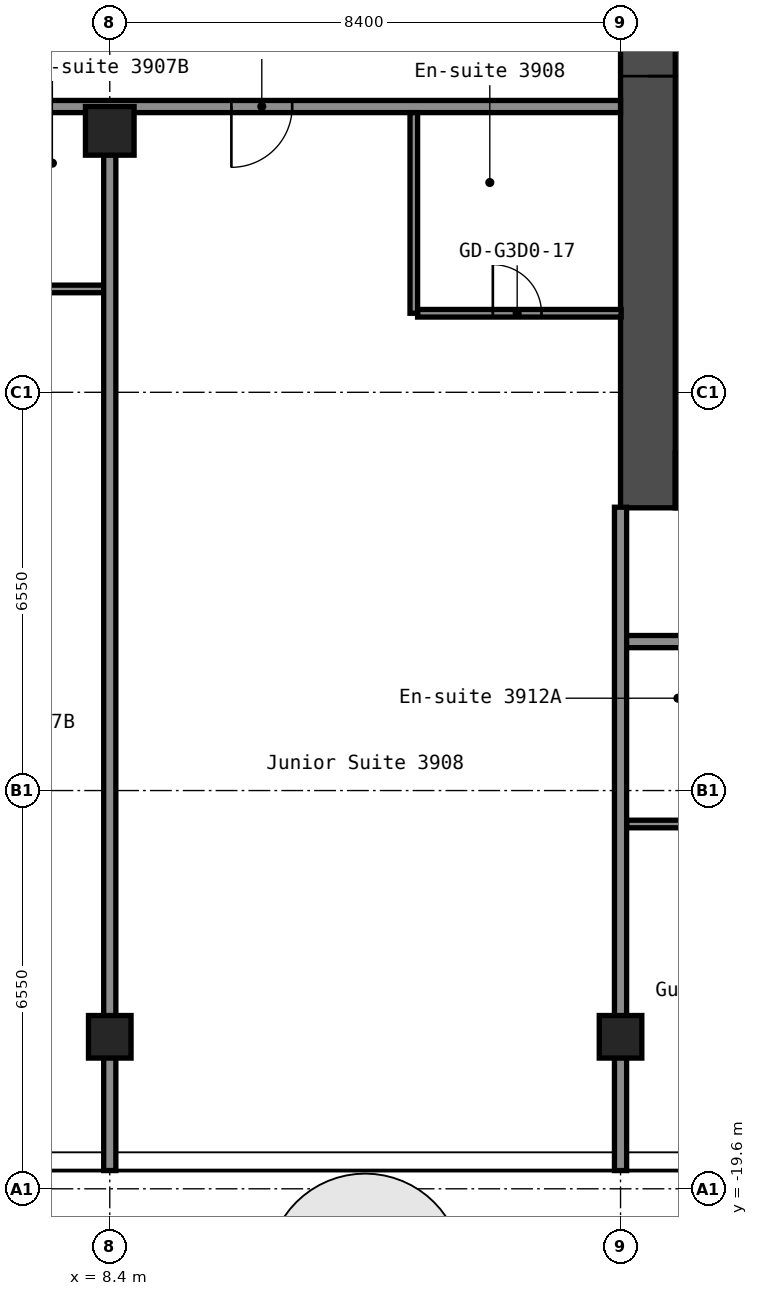
"""IFC4 building model, lengths in metres.
Left out: names, types, materials, properties, quantities, classifications, styles, units other than length and angle.
Written with IfcOpenShell. Run it as: python <this file> out.ifc"""

import sys

from ifc_helpers import new_model, si_unit, direction, frame, frame_2d, origin, origin_2d, place, context, subcontext, project, spatial, rectangle, hollow_rectangle, extrude, element, fill, save


model = new_model("IFC4")
c1 = context("Model", 3, precision=1e-05, world=origin(), true_north=direction((0.0, 1.0)))
c2 = subcontext(c1, "Body", "Model", "MODEL_VIEW")
j1 = project(units=[si_unit("LENGTHUNIT", "METRE"), si_unit("PLANEANGLEUNIT", "RADIAN")], contexts=[c1])
p1 = place(None, origin())
s1 = spatial("IfcSite", under=j1, at=p1, CompositionType="ELEMENT")
p2 = place(p1, origin())
s2 = spatial("IfcBuilding", under=s1, at=p2, CompositionType="ELEMENT")
p3 = place(p2, frame((0.0, 0.0, 140.6)))
s3 = spatial("IfcBuildingStorey", under=s2, at=p3, CompositionType="ELEMENT", Elevation=140.6)
p4 = place(p3, frame((8.4, -17.1, 0.0), z_axis=(0.0, 0.0, 1.0), x_axis=(1.0, 0.0, 0.0)))
e1 = element("IfcColumn", 1, at=p4, inside=s3, PredefinedType="COLUMN", context=c2, shape_type="SweptSolid", body=[
    extrude(hollow_rectangle(XDim=0.7, YDim=0.7, WallThickness=0.028, at=origin_2d()), origin(), (0.0, 0.0, 1.0), 2.75),
])
p5 = place(p3, frame((8.4, -2.2, 0.0), z_axis=(0.0, 0.0, 1.0), x_axis=(1.0, 0.0, 0.0)))
e2 = element("IfcColumn", 2, at=p5, inside=s3, PredefinedType="COLUMN", context=c2, shape_type="SweptSolid", body=[
    extrude(hollow_rectangle(XDim=0.8, YDim=0.8, WallThickness=0.032, at=origin_2d()), origin(), (0.0, 0.0, 1.0), 2.75),
])
p6 = place(p3, frame((16.8, -17.1, 0.0), z_axis=(0.0, 0.0, 1.0), x_axis=(1.0, 0.0, 0.0)))
e3 = element("IfcColumn", 3, at=p6, inside=s3, PredefinedType="COLUMN", context=c2, shape_type="SweptSolid", body=[
    extrude(hollow_rectangle(XDim=0.7, YDim=0.7, WallThickness=0.028, at=origin_2d()), origin(), (0.0, 0.0, 1.0), 2.75),
])
p7 = place(p3, frame((17.25, -8.4, 0.0), z_axis=(0.0, 0.0, 1.0), x_axis=(0.0, 1.0, 0.0)))
e4 = element("IfcWall", 4, at=p7, inside=s3, PredefinedType="SHEAR", context=c2, shape_type="SweptSolid", body=[
    extrude(rectangle(XDim=16.8, YDim=0.9, at=frame_2d((8.4, 0.0))), origin(), (0.0, 0.0, 1.0), 2.75),
])
p8 = place(p7, frame((7.1, 0.0, 0.0)))
e5 = element("IfcOpeningElement", 5, at=p8, cuts=e4, PredefinedType="OPENING", context=c2, shape_type="SweptSolid", body=[
    extrude(rectangle(XDim=1.6, YDim=2.1, at=frame_2d((0.8, 1.05))), frame((0.0, 0.46, 0.0), z_axis=(0.0, -1.0, 0.0), x_axis=(1.0, 0.0, 0.0)), (0.0, 0.0, 1.0), 0.92),
])
p9 = place(p3, frame((17.7, -7.95, 0.0), z_axis=(0.0, 0.0, 1.0), x_axis=(1.0, 0.0, 0.0)))
e6 = element("IfcWall", 6, at=p9, inside=s3, PredefinedType="SHEAR", context=c2, shape_type="SweptSolid", body=[
    extrude(rectangle(XDim=15.0, YDim=0.9, at=frame_2d((7.5, 0.0))), origin(), (0.0, 0.0, 1.0), 2.75),
])
p10 = place(p9, frame((2.55, 0.0, 0.0)))
e7 = element("IfcOpeningElement", 7, at=p10, cuts=e6, PredefinedType="OPENING", context=c2, shape_type="SweptSolid", body=[
    extrude(rectangle(XDim=1.0, YDim=2.1, at=frame_2d((0.5, 1.05))), frame((0.0, 0.46, 0.0), z_axis=(0.0, -1.0, 0.0), x_axis=(1.0, 0.0, 0.0)), (0.0, 0.0, 1.0), 0.92),
])
p11 = place(p3, frame((16.9, -13.6, 0.0), z_axis=(0.0, 0.0, 1.0), x_axis=(1.0, 0.0, 0.0)))
e8 = element("IfcWall", 8, at=p11, inside=s3, PredefinedType="PARTITIONING", context=c2, shape_type="SweptSolid", body=[
    extrude(rectangle(XDim=2.338, YDim=0.125, at=frame_2d((1.169, 0.0))), origin(), (0.0, 0.0, 1.0), 2.75),
])
p12 = place(p3, frame((16.8, -10.6, 0.0), z_axis=(0.0, 0.0, 1.0), x_axis=(1.0, 0.0, 0.0)))
e9 = element("IfcWall", 9, at=p12, inside=s3, PredefinedType="PARTITIONING", context=c2, shape_type="SweptSolid", body=[
    extrude(rectangle(XDim=25.9, YDim=0.2, at=frame_2d((12.95, 0.0))), origin(), (0.0, 0.0, 1.0), 2.75),
])
p13 = place(p12, frame((2.85, 0.0, 0.0)))
e10 = element("IfcOpeningElement", 10, at=p13, cuts=e9, PredefinedType="OPENING", context=c2, shape_type="SweptSolid", body=[
    extrude(rectangle(XDim=1.0, YDim=2.1, at=frame_2d((0.5, 1.05))), frame((0.0, 0.11, 0.0), z_axis=(0.0, -1.0, 0.0), x_axis=(1.0, 0.0, 0.0)), (0.0, 0.0, 1.0), 0.22),
])
p14 = place(p12, frame((4.55, 0.0, 0.0)))
e11 = element("IfcOpeningElement", 11, at=p14, cuts=e9, PredefinedType="OPENING", context=c2, shape_type="SweptSolid", body=[
    extrude(rectangle(XDim=1.0, YDim=2.1, at=frame_2d((0.5, 1.05))), frame((0.0, 0.11, 0.0), z_axis=(0.0, -1.0, 0.0), x_axis=(1.0, 0.0, 0.0)), (0.0, 0.0, 1.0), 0.22),
])
p15 = place(p12, frame((10.4, 0.0, 0.0)))
e12 = element("IfcOpeningElement", 12, at=p15, cuts=e9, PredefinedType="OPENING", context=c2, shape_type="SweptSolid", body=[
    extrude(rectangle(XDim=1.0, YDim=2.1, at=frame_2d((0.5, 1.05))), frame((0.0, 0.11, 0.0), z_axis=(0.0, -1.0, 0.0), x_axis=(1.0, 0.0, 0.0)), (0.0, 0.0, 1.0), 0.22),
])
p16 = place(p12, frame((19.75, 0.0, 0.0)))
e13 = element("IfcOpeningElement", 13, at=p16, cuts=e9, PredefinedType="OPENING", context=c2, shape_type="SweptSolid", body=[
    extrude(rectangle(XDim=1.0, YDim=2.1, at=frame_2d((0.5, 1.05))), frame((0.0, 0.11, 0.0), z_axis=(0.0, -1.0, 0.0), x_axis=(1.0, 0.0, 0.0)), (0.0, 0.0, 1.0), 0.22),
])
p17 = place(p12, frame((21.65, 0.0, 0.0)))
e14 = element("IfcOpeningElement", 14, at=p17, cuts=e9, PredefinedType="OPENING", context=c2, shape_type="SweptSolid", body=[
    extrude(rectangle(XDim=1.0, YDim=2.1, at=frame_2d((0.5, 1.05))), frame((0.0, 0.11, 0.0), z_axis=(0.0, -1.0, 0.0), x_axis=(1.0, 0.0, 0.0)), (0.0, 0.0, 1.0), 0.22),
])
p18 = place(p3, frame((13.462, -5.2, 0.0), z_axis=(0.0, 0.0, 1.0), x_axis=(1.0, 0.0, 0.0)))
e15 = element("IfcWall", 15, at=p18, inside=s3, PredefinedType="PARTITIONING", context=c2, shape_type="SweptSolid", body=[
    extrude(rectangle(XDim=3.348, YDim=0.125, at=frame_2d((1.674, 0.0))), origin(), (0.0, 0.0, 1.0), 2.75),
])
p19 = place(p18, frame((1.238, 0.0, 0.0)))
e16 = element("IfcOpeningElement", 16, at=p19, cuts=e15, PredefinedType="OPENING", context=c2, shape_type="SweptSolid", body=[
    extrude(rectangle(XDim=0.8, YDim=2.1, at=frame_2d((0.4, 1.05))), frame((0.0, 0.073, 0.0), z_axis=(0.0, -1.0, 0.0), x_axis=(1.0, 0.0, 0.0)), (0.0, 0.0, 1.0), 0.145),
])
p20 = place(p3, frame((5.962, -4.8, 0.0), z_axis=(0.0, 0.0, 1.0), x_axis=(1.0, 0.0, 0.0)))
e17 = element("IfcWall", 17, at=p20, inside=s3, PredefinedType="PARTITIONING", context=c2, shape_type="SweptSolid", body=[
    extrude(rectangle(XDim=2.338, YDim=0.125, at=frame_2d((1.169, 0.0))), origin(), (0.0, 0.0, 1.0), 2.75),
])
p21 = place(p3, frame((-16.8, -1.8, 0.0), z_axis=(0.0, 0.0, 1.0), x_axis=(1.0, 0.0, 0.0)))
e18 = element("IfcWall", 18, at=p21, inside=s3, PredefinedType="PARTITIONING", context=c2, shape_type="SweptSolid", body=[
    extrude(rectangle(XDim=33.6, YDim=0.2, at=frame_2d((16.8, 0.0))), origin(), (0.0, 0.0, 1.0), 2.75),
])
p22 = place(p21, frame((2.85, 0.0, 0.0)))
e19 = element("IfcOpeningElement", 19, at=p22, cuts=e18, PredefinedType="OPENING", context=c2, shape_type="SweptSolid", body=[
    extrude(rectangle(XDim=1.0, YDim=2.1, at=frame_2d((0.5, 1.05))), frame((0.0, 0.11, 0.0), z_axis=(0.0, -1.0, 0.0), x_axis=(1.0, 0.0, 0.0)), (0.0, 0.0, 1.0), 0.22),
])
p23 = place(p21, frame((4.55, 0.0, 0.0)))
e20 = element("IfcOpeningElement", 20, at=p23, cuts=e18, PredefinedType="OPENING", context=c2, shape_type="SweptSolid", body=[
    extrude(rectangle(XDim=1.0, YDim=2.1, at=frame_2d((0.5, 1.05))), frame((0.0, 0.11, 0.0), z_axis=(0.0, -1.0, 0.0), x_axis=(1.0, 0.0, 0.0)), (0.0, 0.0, 1.0), 0.22),
])
p24 = place(p21, frame((12.1, 0.0, 0.0)))
e21 = element("IfcOpeningElement", 21, at=p24, cuts=e18, PredefinedType="OPENING", context=c2, shape_type="SweptSolid", body=[
    extrude(rectangle(XDim=1.0, YDim=2.1, at=frame_2d((0.5, 1.05))), frame((0.0, 0.11, 0.0), z_axis=(0.0, -1.0, 0.0), x_axis=(1.0, 0.0, 0.0)), (0.0, 0.0, 1.0), 0.22),
])
p25 = place(p21, frame((19.65, 0.0, 0.0)))
e22 = element("IfcOpeningElement", 22, at=p25, cuts=e18, PredefinedType="OPENING", context=c2, shape_type="SweptSolid", body=[
    extrude(rectangle(XDim=1.0, YDim=2.1, at=frame_2d((0.5, 1.05))), frame((0.0, 0.11, 0.0), z_axis=(0.0, -1.0, 0.0), x_axis=(1.0, 0.0, 0.0)), (0.0, 0.0, 1.0), 0.22),
])
p26 = place(p21, frame((21.35, 0.0, 0.0)))
e23 = element("IfcOpeningElement", 23, at=p26, cuts=e18, PredefinedType="OPENING", context=c2, shape_type="SweptSolid", body=[
    extrude(rectangle(XDim=1.0, YDim=2.1, at=frame_2d((0.5, 1.05))), frame((0.0, 0.11, 0.0), z_axis=(0.0, -1.0, 0.0), x_axis=(1.0, 0.0, 0.0)), (0.0, 0.0, 1.0), 0.22),
])
p27 = place(p21, frame((27.2, 0.0, 0.0)))
e24 = element("IfcOpeningElement", 24, at=p27, cuts=e18, PredefinedType="OPENING", context=c2, shape_type="SweptSolid", body=[
    extrude(rectangle(XDim=1.0, YDim=2.1, at=frame_2d((0.5, 1.05))), frame((0.0, 0.11, 0.0), z_axis=(0.0, -1.0, 0.0), x_axis=(1.0, 0.0, 0.0)), (0.0, 0.0, 1.0), 0.22),
])
p28 = place(p3, frame((8.4, -19.3, 0.0), z_axis=(0.0, 0.0, 1.0), x_axis=(0.0, 1.0, 0.0)))
e25 = element("IfcWall", 25, at=p28, inside=s3, PredefinedType="PARTITIONING", context=c2, shape_type="SweptSolid", body=[
    extrude(rectangle(XDim=16.71, YDim=0.2, at=frame_2d((8.355, 0.0))), origin(), (0.0, 0.0, 1.0), 2.75),
])
p29 = place(p3, frame((13.4, -5.2, 0.0), z_axis=(0.0, 0.0, 1.0), x_axis=(0.0, 1.0, 0.0)))
e26 = element("IfcWall", 26, at=p29, inside=s3, PredefinedType="PARTITIONING", context=c2, shape_type="SweptSolid", body=[
    extrude(rectangle(XDim=3.3, YDim=0.125, at=frame_2d((1.65, 0.0))), origin(), (0.0, 0.0, 1.0), 2.75),
])
p30 = place(p3, frame((16.8, -19.3, 0.0), z_axis=(0.0, 0.0, 1.0), x_axis=(0.0, 1.0, 0.0)))
e27 = element("IfcWall", 27, at=p30, inside=s3, PredefinedType="PARTITIONING", context=c2, shape_type="SweptSolid", body=[
    extrude(rectangle(XDim=10.91, YDim=0.2, at=frame_2d((5.455, 0.0))), origin(), (0.0, 0.0, 1.0), 2.75),
])
p31 = place(p8, origin())
e28 = element("IfcDoor", 28, at=p31, inside=s3, OperationType="DOUBLE_DOOR_SINGLE_SWING", PredefinedType="DOOR", context=c2, shape_type="SweptSolid", body=[
    extrude(rectangle(XDim=1.6, YDim=2.1, at=frame_2d((0.8, 1.05))), frame((0.0, 0.025, 0.0), z_axis=(0.0, -1.0, 0.0), x_axis=(1.0, 0.0, 0.0)), (0.0, 0.0, 1.0), 0.05),
])
fill(e5, e28)
p32 = place(p19, origin())
e29 = element("IfcDoor", 29, at=p32, inside=s3, OperationType="SINGLE_SWING_RIGHT", PredefinedType="DOOR", context=c2, shape_type="SweptSolid", body=[
    extrude(rectangle(XDim=0.8, YDim=2.1, at=frame_2d((0.4, 1.05))), frame((0.0, 0.025, 0.0), z_axis=(0.0, -1.0, 0.0), x_axis=(1.0, 0.0, 0.0)), (0.0, 0.0, 1.0), 0.05),
])
fill(e16, e29)
p33 = place(p27, origin())
e30 = element("IfcDoor", 30, at=p33, inside=s3, OperationType="SINGLE_SWING_LEFT", PredefinedType="DOOR", context=c2, shape_type="SweptSolid", body=[
    extrude(rectangle(XDim=1.0, YDim=2.1, at=frame_2d((0.5, 1.05))), frame((0.0, 0.025, 0.0), z_axis=(0.0, -1.0, 0.0), x_axis=(1.0, 0.0, 0.0)), (0.0, 0.0, 1.0), 0.05),
])
fill(e24, e30)
save(model, sys.argv[1])
